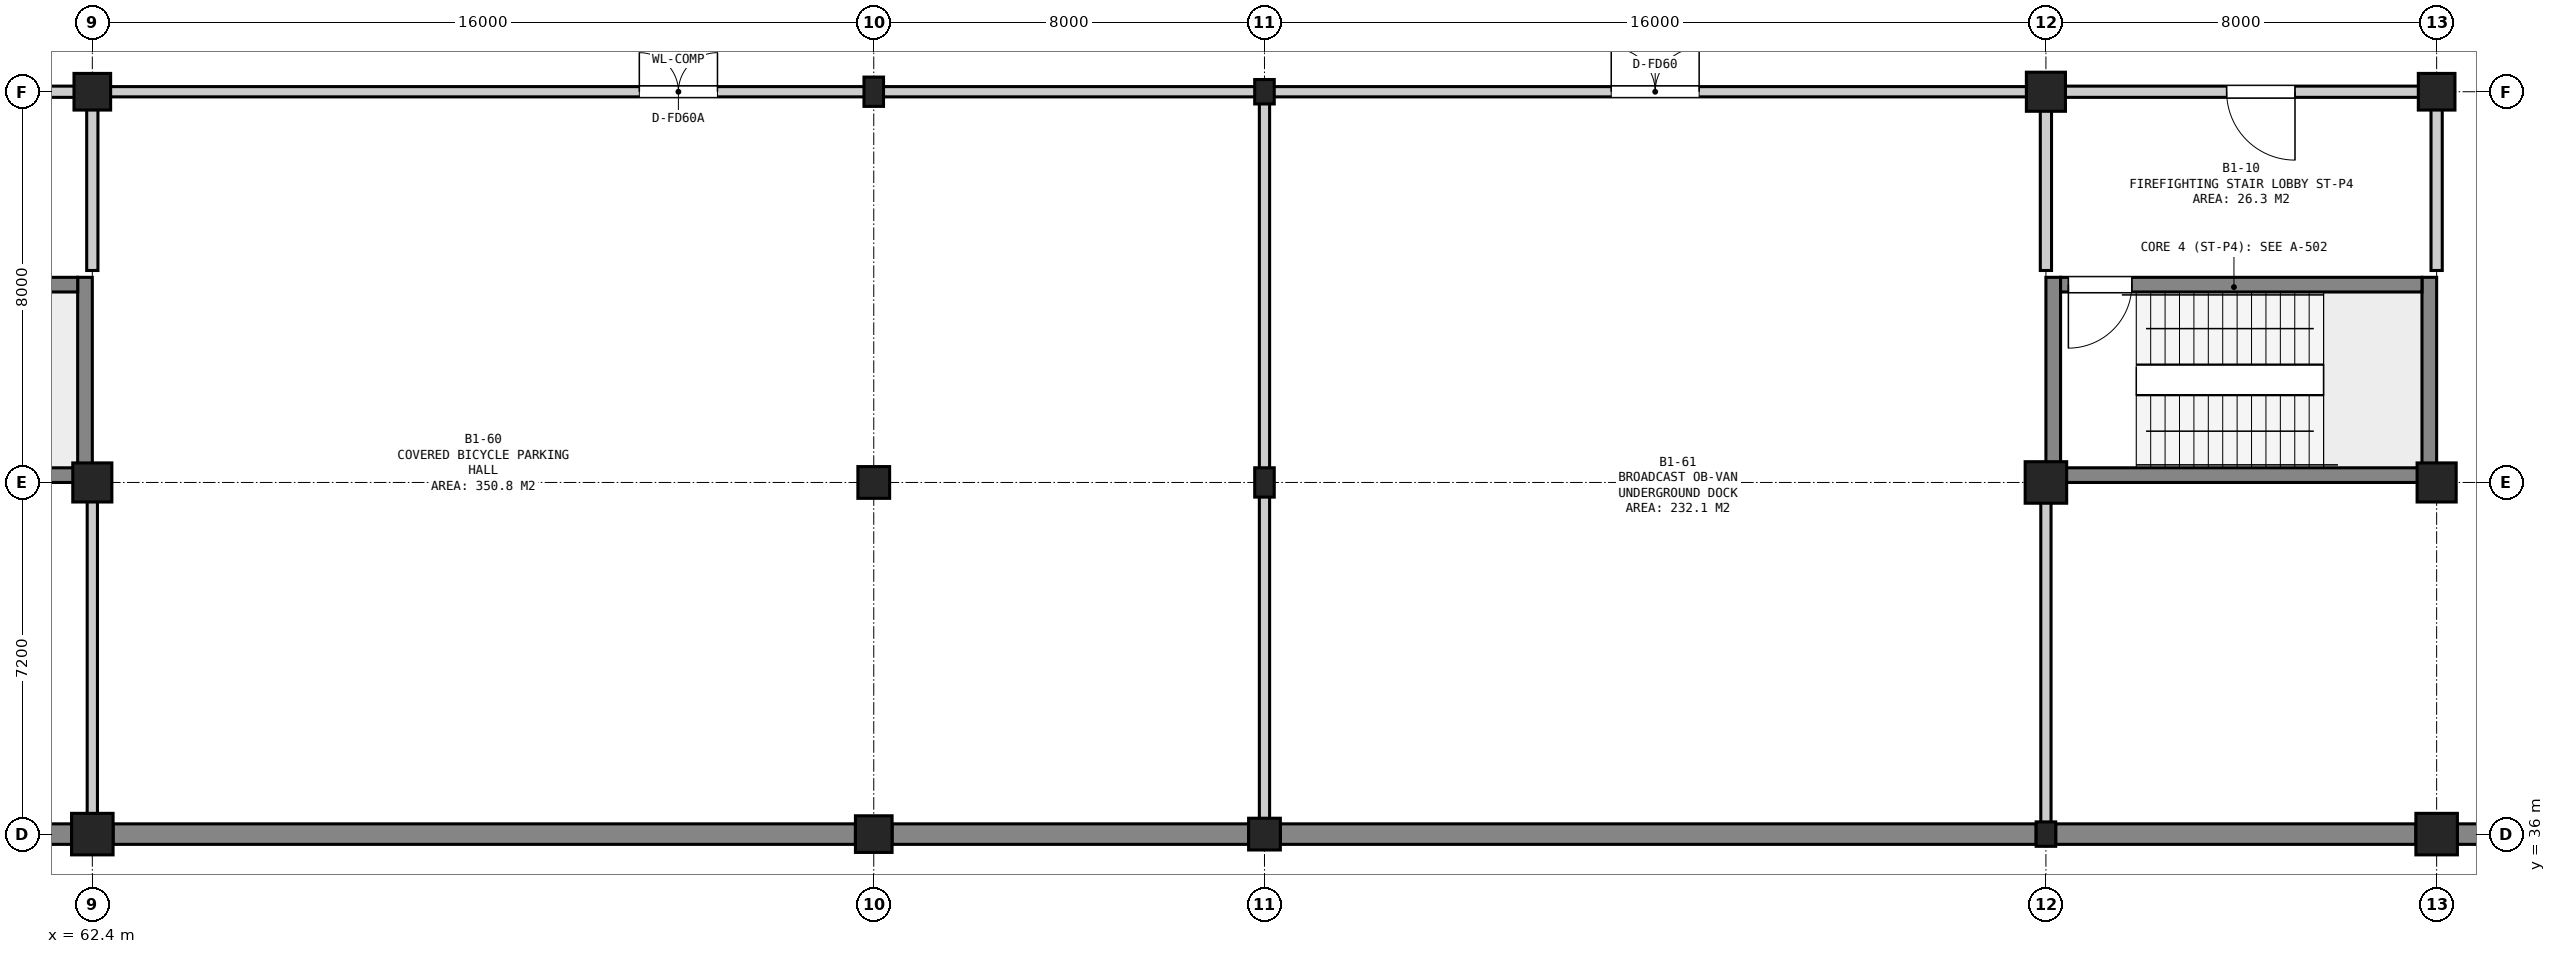
"""IFC4 building model, lengths in metres.
Left out: names, types, materials, properties, quantities, classifications, styles, units other than length and angle.
Written with IfcOpenShell. Run it as: python <this file> out.ifc"""

import sys

from ifc_helpers import new_model, si_unit, direction, frame, frame_2d, origin, origin_2d, place, context, subcontext, project, spatial, rectangle, extrude, element, fill, save


model = new_model("IFC4")
c1 = context("Model", 3, precision=1e-05, world=origin(), true_north=direction((0.0, 1.0)))
c2 = subcontext(c1, "Body", "Model", "MODEL_VIEW")
j1 = project(units=[si_unit("LENGTHUNIT", "METRE"), si_unit("PLANEANGLEUNIT", "RADIAN")], contexts=[c1])
p1 = place(None, origin())
s1 = spatial("IfcSite", under=j1, at=p1, CompositionType="ELEMENT")
p2 = place(p1, origin())
s2 = spatial("IfcBuilding", under=s1, at=p2, CompositionType="ELEMENT")
p3 = place(p2, frame((0.0, 0.0, -4.5)))
s3 = spatial("IfcBuildingStorey", under=s2, at=p3, CompositionType="ELEMENT", Elevation=-4.5)
p4 = place(p3, frame((62.4, 36.0, 0.0), z_axis=(0.0, 0.0, 1.0), x_axis=(1.0, 0.0, 0.0)))
e1 = element("IfcColumn", 1, at=p4, inside=s3, PredefinedType="COLUMN", context=c2, shape_type="SweptSolid", body=[
    extrude(rectangle(XDim=0.85, YDim=0.85, at=origin_2d()), origin(), (0.0, 0.0, 1.0), 4.5),
])
p5 = place(p3, frame((62.4, 43.2, 0.0), z_axis=(0.0, 0.0, 1.0), x_axis=(1.0, 0.0, 0.0)))
e2 = element("IfcColumn", 2, at=p5, inside=s3, PredefinedType="COLUMN", context=c2, shape_type="SweptSolid", body=[
    extrude(rectangle(XDim=0.8, YDim=0.8, at=origin_2d()), origin(), (0.0, 0.0, 1.0), 4.5),
])
for number, where, z_axis, x_axis in (
    (3, (62.4, 51.2, 0.0), (0.0, 0.0, 1.0), (1.0, 0.0, 0.0)),
    (4, (78.4, 36.0, 0.0), (0.0, 0.0, 1.0), (1.0, 0.0, 0.0)),
):
    element("IfcColumn", number, at=place(p3, frame(where, z_axis=z_axis, x_axis=x_axis)), inside=s3, PredefinedType="COLUMN", context=c2, shape_type="SweptSolid", body=[
        extrude(rectangle(XDim=0.75, YDim=0.75, at=origin_2d()), origin(), (0.0, 0.0, 1.0), 4.5),
    ])
p6 = place(p3, frame((78.4, 43.2, 0.0), z_axis=(0.0, 0.0, 1.0), x_axis=(1.0, 0.0, 0.0)))
e5 = element("IfcColumn", 5, at=p6, inside=s3, PredefinedType="COLUMN", context=c2, shape_type="SweptSolid", body=[
    extrude(rectangle(XDim=0.65, YDim=0.65, at=origin_2d()), origin(), (0.0, 0.0, 1.0), 4.5),
])
p7 = place(p3, frame((78.4, 51.2, 0.0), z_axis=(0.0, 0.0, 1.0), x_axis=(1.0, 0.0, 0.0)))
e6 = element("IfcColumn", 6, at=p7, inside=s3, PredefinedType="COLUMN", context=c2, shape_type="SweptSolid", body=[
    extrude(rectangle(XDim=0.4, YDim=0.6, at=origin_2d()), origin(), (0.0, 0.0, 1.0), 4.5),
])
p8 = place(p3, frame((86.4, 36.0, 0.0), z_axis=(0.0, 0.0, 1.0), x_axis=(1.0, 0.0, 0.0)))
e7 = element("IfcColumn", 7, at=p8, inside=s3, PredefinedType="COLUMN", context=c2, shape_type="SweptSolid", body=[
    extrude(rectangle(XDim=0.65, YDim=0.65, at=origin_2d()), origin(), (0.0, 0.0, 1.0), 4.5),
])
p9 = place(p3, frame((86.4, 43.2, 0.0), z_axis=(0.0, 0.0, 1.0), x_axis=(1.0, 0.0, 0.0)))
e8 = element("IfcColumn", 8, at=p9, inside=s3, PredefinedType="COLUMN", context=c2, shape_type="SweptSolid", body=[
    extrude(rectangle(XDim=0.4, YDim=0.6, at=origin_2d()), origin(), (0.0, 0.0, 1.0), 4.5),
])
for number, where, z_axis, x_axis in (
    (9, (86.4, 51.2, 0.0), (0.0, 0.0, 1.0), (1.0, 0.0, 0.0)),
    (10, (102.4, 36.0, 0.0), (0.0, 0.0, 1.0), (1.0, 0.0, 0.0)),
):
    element("IfcColumn", number, at=place(p3, frame(where, z_axis=z_axis, x_axis=x_axis)), inside=s3, PredefinedType="COLUMN", context=c2, shape_type="SweptSolid", body=[
        extrude(rectangle(XDim=0.4, YDim=0.5, at=origin_2d()), origin(), (0.0, 0.0, 1.0), 4.5),
    ])
p10 = place(p3, frame((102.4, 43.2, 0.0), z_axis=(0.0, 0.0, 1.0), x_axis=(1.0, 0.0, 0.0)))
e11 = element("IfcColumn", 11, at=p10, inside=s3, PredefinedType="COLUMN", context=c2, shape_type="SweptSolid", body=[
    extrude(rectangle(XDim=0.85, YDim=0.85, at=origin_2d()), origin(), (0.0, 0.0, 1.0), 4.5),
])
p11 = place(p3, frame((102.4, 51.2, 0.0), z_axis=(0.0, 0.0, 1.0), x_axis=(1.0, 0.0, 0.0)))
e12 = element("IfcColumn", 12, at=p11, inside=s3, PredefinedType="COLUMN", context=c2, shape_type="SweptSolid", body=[
    extrude(rectangle(XDim=0.8, YDim=0.8, at=origin_2d()), origin(), (0.0, 0.0, 1.0), 4.5),
])
p12 = place(p3, frame((110.4, 36.0, 0.0), z_axis=(0.0, 0.0, 1.0), x_axis=(1.0, 0.0, 0.0)))
e13 = element("IfcColumn", 13, at=p12, inside=s3, PredefinedType="COLUMN", context=c2, shape_type="SweptSolid", body=[
    extrude(rectangle(XDim=0.85, YDim=0.85, at=origin_2d()), origin(), (0.0, 0.0, 1.0), 4.5),
])
p13 = place(p3, frame((110.4, 43.2, 0.0), z_axis=(0.0, 0.0, 1.0), x_axis=(1.0, 0.0, 0.0)))
e14 = element("IfcColumn", 14, at=p13, inside=s3, PredefinedType="COLUMN", context=c2, shape_type="SweptSolid", body=[
    extrude(rectangle(XDim=0.8, YDim=0.8, at=origin_2d()), origin(), (0.0, 0.0, 1.0), 4.5),
])
p14 = place(p3, frame((110.4, 51.2, 0.0), z_axis=(0.0, 0.0, 1.0), x_axis=(1.0, 0.0, 0.0)))
e15 = element("IfcColumn", 15, at=p14, inside=s3, PredefinedType="COLUMN", context=c2, shape_type="SweptSolid", body=[
    extrude(rectangle(XDim=0.75, YDim=0.75, at=origin_2d()), origin(), (0.0, 0.0, 1.0), 4.5),
])
p15 = place(p3, frame((54.6, 36.0, 0.0), z_axis=(0.0, 0.0, 1.0), x_axis=(1.0, 0.0, 0.0)))
e16 = element("IfcWall", 16, at=p15, inside=s3, PredefinedType="SOLIDWALL", context=c2, shape_type="SweptSolid", body=[
    extrude(rectangle(XDim=7.375, YDim=0.42, at=frame_2d((3.688, 0.0))), origin(), (0.0, 0.0, 1.0), 4.08),
])
p16 = place(p3, frame((62.825, 36.0, 0.0), z_axis=(0.0, 0.0, 1.0), x_axis=(1.0, 0.0, 0.0)))
e17 = element("IfcWall", 17, at=p16, inside=s3, PredefinedType="SOLIDWALL", context=c2, shape_type="SweptSolid", body=[
    extrude(rectangle(XDim=15.2, YDim=0.42, at=frame_2d((7.6, 0.0))), origin(), (0.0, 0.0, 1.0), 4.08),
])
p17 = place(p3, frame((78.775, 36.0, 0.0), z_axis=(0.0, 0.0, 1.0), x_axis=(1.0, 0.0, 0.0)))
e18 = element("IfcWall", 18, at=p17, inside=s3, PredefinedType="SOLIDWALL", context=c2, shape_type="SweptSolid", body=[
    extrude(rectangle(XDim=7.3, YDim=0.42, at=frame_2d((3.65, 0.0))), origin(), (0.0, 0.0, 1.0), 4.08),
])
p18 = place(p3, frame((86.725, 36.0, 0.0), z_axis=(0.0, 0.0, 1.0), x_axis=(1.0, 0.0, 0.0)))
e19 = element("IfcWall", 19, at=p18, inside=s3, PredefinedType="SOLIDWALL", context=c2, shape_type="SweptSolid", body=[
    extrude(rectangle(XDim=15.475, YDim=0.42, at=frame_2d((7.737, 0.0))), origin(), (0.0, 0.0, 1.0), 4.08),
])
p19 = place(p3, frame((102.6, 36.0, 0.0), z_axis=(0.0, 0.0, 1.0), x_axis=(1.0, 0.0, 0.0)))
e20 = element("IfcWall", 20, at=p19, inside=s3, PredefinedType="SOLIDWALL", context=c2, shape_type="SweptSolid", body=[
    extrude(rectangle(XDim=7.375, YDim=0.42, at=frame_2d((3.688, 0.0))), origin(), (0.0, 0.0, 1.0), 4.08),
])
p20 = place(p3, frame((110.825, 36.0, 0.0), z_axis=(0.0, 0.0, 1.0), x_axis=(1.0, 0.0, 0.0)))
e21 = element("IfcWall", 21, at=p20, inside=s3, PredefinedType="SOLIDWALL", context=c2, shape_type="SweptSolid", body=[
    extrude(rectangle(XDim=5.575, YDim=0.42, at=frame_2d((2.788, 0.0))), origin(), (0.0, 0.0, 1.0), 4.08),
])
p21 = place(p3, frame((62.25, 43.2, 0.0), z_axis=(0.0, 0.0, 1.0), x_axis=(0.0, 1.0, 0.0)))
e22 = element("IfcWall", 22, at=p21, inside=s3, PredefinedType="SHEAR", context=c2, shape_type="SweptSolid", body=[
    extrude(rectangle(XDim=4.2, YDim=0.3, at=frame_2d((2.1, 0.0))), origin(), (0.0, 0.0, 1.0), 4.08),
])
p22 = place(p3, frame((54.7, 43.35, 0.0), z_axis=(0.0, 0.0, 1.0), x_axis=(1.0, 0.0, 0.0)))
e23 = element("IfcWall", 23, at=p22, inside=s3, PredefinedType="SHEAR", context=c2, shape_type="SweptSolid", body=[
    extrude(rectangle(XDim=7.4, YDim=0.3, at=frame_2d((3.7, 0.0))), origin(), (0.0, 0.0, 1.0), 4.08),
])
p23 = place(p3, frame((54.7, 47.25, 0.0), z_axis=(0.0, 0.0, 1.0), x_axis=(1.0, 0.0, 0.0)))
e24 = element("IfcWall", 24, at=p23, inside=s3, PredefinedType="SHEAR", context=c2, shape_type="SweptSolid", body=[
    extrude(rectangle(XDim=7.4, YDim=0.3, at=frame_2d((3.7, 0.0))), origin(), (0.0, 0.0, 1.0), 4.08),
])
p24 = place(p23, frame((0.16, 0.0, 0.0)))
e25 = element("IfcOpeningElement", 25, at=p24, cuts=e24, PredefinedType="OPENING", context=c2, shape_type="SweptSolid", body=[
    extrude(rectangle(XDim=1.3, YDim=2.18, at=frame_2d((0.65, 1.09))), frame((0.0, 0.162, 0.0), z_axis=(0.0, -1.0, 0.0), x_axis=(1.0, 0.0, 0.0)), (0.0, 0.0, 1.0), 0.324),
])
for number, where, z_axis, x_axis in (
    (26, (102.55, 43.2, 0.0), (0.0, 0.0, 1.0), (0.0, 1.0, 0.0)),
    (27, (110.25, 43.2, 0.0), (0.0, 0.0, 1.0), (0.0, 1.0, 0.0)),
):
    element("IfcWall", number, at=place(p3, frame(where, z_axis=z_axis, x_axis=x_axis)), inside=s3, PredefinedType="SHEAR", context=c2, shape_type="SweptSolid", body=[
        extrude(rectangle(XDim=4.2, YDim=0.3, at=frame_2d((2.1, 0.0))), origin(), (0.0, 0.0, 1.0), 4.08),
    ])
p25 = place(p3, frame((102.7, 43.35, 0.0), z_axis=(0.0, 0.0, 1.0), x_axis=(1.0, 0.0, 0.0)))
e28 = element("IfcWall", 28, at=p25, inside=s3, PredefinedType="SHEAR", context=c2, shape_type="SweptSolid", body=[
    extrude(rectangle(XDim=7.4, YDim=0.3, at=frame_2d((3.7, 0.0))), origin(), (0.0, 0.0, 1.0), 4.08),
])
p26 = place(p3, frame((102.7, 47.25, 0.0), z_axis=(0.0, 0.0, 1.0), x_axis=(1.0, 0.0, 0.0)))
e29 = element("IfcWall", 29, at=p26, inside=s3, PredefinedType="SHEAR", context=c2, shape_type="SweptSolid", body=[
    extrude(rectangle(XDim=7.4, YDim=0.3, at=frame_2d((3.7, 0.0))), origin(), (0.0, 0.0, 1.0), 4.08),
])
p27 = place(p26, frame((0.16, 0.0, 0.0)))
e30 = element("IfcOpeningElement", 30, at=p27, cuts=e29, PredefinedType="OPENING", context=c2, shape_type="SweptSolid", body=[
    extrude(rectangle(XDim=1.3, YDim=2.18, at=frame_2d((0.65, 1.09))), frame((0.0, 0.162, 0.0), z_axis=(0.0, -1.0, 0.0), x_axis=(1.0, 0.0, 0.0)), (0.0, 0.0, 1.0), 0.324),
])
p28 = place(p3, frame((54.54, 51.2, 0.0), z_axis=(0.0, 0.0, 1.0), x_axis=(1.0, 0.0, 0.0)))
e31 = element("IfcWall", 31, at=p28, inside=s3, PredefinedType="SOLIDWALL", context=c2, shape_type="SweptSolid", body=[
    extrude(rectangle(XDim=7.72, YDim=0.23, at=frame_2d((3.86, 0.0))), origin(), (0.0, 0.0, 1.0), 3.525),
])
p29 = place(p28, frame((3.56, 0.0, 0.0)))
e32 = element("IfcOpeningElement", 32, at=p29, cuts=e31, PredefinedType="OPENING", context=c2, shape_type="SweptSolid", body=[
    extrude(rectangle(XDim=1.4, YDim=2.2, at=frame_2d((0.7, 1.1))), frame((0.0, 0.127, 0.0), z_axis=(0.0, -1.0, 0.0), x_axis=(1.0, 0.0, 0.0)), (0.0, 0.0, 1.0), 0.254),
])
p30 = place(p3, frame((62.4, 47.54, 0.0), z_axis=(0.0, 0.0, 1.0), x_axis=(0.0, 1.0, 0.0)))
e33 = element("IfcWall", 33, at=p30, inside=s3, PredefinedType="SOLIDWALL", context=c2, shape_type="SweptSolid", body=[
    extrude(rectangle(XDim=3.52, YDim=0.23, at=frame_2d((1.76, 0.0))), origin(), (0.0, 0.0, 1.0), 3.525),
])
p31 = place(p3, frame((102.54, 51.2, 0.0), z_axis=(0.0, 0.0, 1.0), x_axis=(1.0, 0.0, 0.0)))
e34 = element("IfcWall", 34, at=p31, inside=s3, PredefinedType="SOLIDWALL", context=c2, shape_type="SweptSolid", body=[
    extrude(rectangle(XDim=7.72, YDim=0.23, at=frame_2d((3.86, 0.0))), origin(), (0.0, 0.0, 1.0), 3.225),
])
p32 = place(p31, frame((3.56, 0.0, 0.0)))
e35 = element("IfcOpeningElement", 35, at=p32, cuts=e34, PredefinedType="OPENING", context=c2, shape_type="SweptSolid", body=[
    extrude(rectangle(XDim=1.4, YDim=2.2, at=frame_2d((0.7, 1.1))), frame((0.0, 0.127, 0.0), z_axis=(0.0, -1.0, 0.0), x_axis=(1.0, 0.0, 0.0)), (0.0, 0.0, 1.0), 0.254),
])
p33 = place(p3, frame((102.4, 47.54, 0.0), z_axis=(0.0, 0.0, 1.0), x_axis=(0.0, 1.0, 0.0)))
e36 = element("IfcWall", 36, at=p33, inside=s3, PredefinedType="SOLIDWALL", context=c2, shape_type="SweptSolid", body=[
    extrude(rectangle(XDim=3.52, YDim=0.23, at=frame_2d((1.76, 0.0))), origin(), (0.0, 0.0, 1.0), 3.575),
])
p34 = place(p3, frame((110.4, 47.54, 0.0), z_axis=(0.0, 0.0, 1.0), x_axis=(0.0, 1.0, 0.0)))
e37 = element("IfcWall", 37, at=p34, inside=s3, PredefinedType="SOLIDWALL", context=c2, shape_type="SweptSolid", body=[
    extrude(rectangle(XDim=3.52, YDim=0.23, at=frame_2d((1.76, 0.0))), origin(), (0.0, 0.0, 1.0), 3.475),
])
p35 = place(p3, frame((62.54, 51.2, 0.0), z_axis=(0.0, 0.0, 1.0), x_axis=(1.0, 0.0, 0.0)))
e38 = element("IfcWall", 38, at=p35, inside=s3, PredefinedType="SOLIDWALL", context=c2, shape_type="SweptSolid", body=[
    extrude(rectangle(XDim=23.72, YDim=0.21, at=frame_2d((11.86, 0.0))), origin(), (0.0, 0.0, 1.0), 2.925),
])
p36 = place(p35, frame((11.06, 0.0, 0.0)))
e39 = element("IfcOpeningElement", 39, at=p36, cuts=e38, PredefinedType="OPENING", context=c2, shape_type="SweptSolid", body=[
    extrude(rectangle(XDim=1.6, YDim=2.2, at=frame_2d((0.8, 1.1))), frame((0.0, 0.117, 0.0), z_axis=(0.0, -1.0, 0.0), x_axis=(1.0, 0.0, 0.0)), (0.0, 0.0, 1.0), 0.234),
])
p37 = place(p3, frame((62.4, 36.105, 0.0), z_axis=(0.0, 0.0, 1.0), x_axis=(0.0, 1.0, 0.0)))
e40 = element("IfcWall", 40, at=p37, inside=s3, PredefinedType="SOLIDWALL", context=c2, shape_type="SweptSolid", body=[
    extrude(rectangle(XDim=6.955, YDim=0.21, at=frame_2d((3.478, 0.0))), origin(), (0.0, 0.0, 1.0), 3.425),
])
p38 = place(p3, frame((86.4, 36.225, 0.0), z_axis=(0.0, 0.0, 1.0), x_axis=(0.0, 1.0, 0.0)))
e41 = element("IfcWall", 41, at=p38, inside=s3, PredefinedType="SOLIDWALL", context=c2, shape_type="SweptSolid", body=[
    extrude(rectangle(XDim=14.835, YDim=0.21, at=frame_2d((7.417, 0.0))), origin(), (0.0, 0.0, 1.0), 3.275),
])
p39 = place(p3, frame((86.54, 51.2, 0.0), z_axis=(0.0, 0.0, 1.0), x_axis=(1.0, 0.0, 0.0)))
e42 = element("IfcWall", 42, at=p39, inside=s3, PredefinedType="SOLIDWALL", context=c2, shape_type="SweptSolid", body=[
    extrude(rectangle(XDim=15.72, YDim=0.21, at=frame_2d((7.86, 0.0))), origin(), (0.0, 0.0, 1.0), 2.925),
])
p40 = place(p39, frame((6.96, 0.0, 0.0)))
e43 = element("IfcOpeningElement", 43, at=p40, cuts=e42, PredefinedType="OPENING", context=c2, shape_type="SweptSolid", body=[
    extrude(rectangle(XDim=1.8, YDim=2.3, at=frame_2d((0.9, 1.15))), frame((0.0, 0.117, 0.0), z_axis=(0.0, -1.0, 0.0), x_axis=(1.0, 0.0, 0.0)), (0.0, 0.0, 1.0), 0.234),
])
p41 = place(p3, frame((102.4, 36.225, 0.0), z_axis=(0.0, 0.0, 1.0), x_axis=(0.0, 1.0, 0.0)))
e44 = element("IfcWall", 44, at=p41, inside=s3, PredefinedType="SOLIDWALL", context=c2, shape_type="SweptSolid", body=[
    extrude(rectangle(XDim=6.835, YDim=0.21, at=frame_2d((3.417, 0.0))), origin(), (0.0, 0.0, 1.0), 3.475),
])
p42 = place(p27, frame((1.3, 0.0, 0.0), z_axis=(0.0, 0.0, 1.0), x_axis=(-1.0, 0.0, 0.0)))
e45 = element("IfcDoor", 45, at=p42, inside=s3, OperationType="SINGLE_SWING_RIGHT", PredefinedType="DOOR", context=c2, shape_type="SweptSolid", body=[
    extrude(rectangle(XDim=1.3, YDim=2.18, at=frame_2d((0.65, 1.09))), frame((0.0, 0.025, 0.0), z_axis=(0.0, -1.0, 0.0), x_axis=(1.0, 0.0, 0.0)), (0.0, 0.0, 1.0), 0.05),
])
fill(e30, e45)
p43 = place(p32, frame((1.4, 0.0, 0.0), z_axis=(0.0, 0.0, 1.0), x_axis=(-1.0, 0.0, 0.0)))
e46 = element("IfcDoor", 46, at=p43, inside=s3, OperationType="SINGLE_SWING_LEFT", PredefinedType="DOOR", context=c2, shape_type="SweptSolid", body=[
    extrude(rectangle(XDim=1.4, YDim=2.2, at=frame_2d((0.7, 1.1))), frame((0.0, 0.025, 0.0), z_axis=(0.0, -1.0, 0.0), x_axis=(1.0, 0.0, 0.0)), (0.0, 0.0, 1.0), 0.05),
])
fill(e35, e46)
p44 = place(p36, origin())
e47 = element("IfcDoor", 47, at=p44, inside=s3, OperationType="DOUBLE_DOOR_SINGLE_SWING", PredefinedType="DOOR", context=c2, shape_type="SweptSolid", body=[
    extrude(rectangle(XDim=1.6, YDim=2.2, at=frame_2d((0.8, 1.1))), frame((0.0, 0.025, 0.0), z_axis=(0.0, -1.0, 0.0), x_axis=(1.0, 0.0, 0.0)), (0.0, 0.0, 1.0), 0.05),
])
fill(e39, e47)
p45 = place(p40, origin())
e48 = element("IfcDoor", 48, at=p45, inside=s3, OperationType="DOUBLE_DOOR_SINGLE_SWING", PredefinedType="DOOR", context=c2, shape_type="SweptSolid", body=[
    extrude(rectangle(XDim=1.8, YDim=2.3, at=frame_2d((0.9, 1.15))), frame((0.0, 0.025, 0.0), z_axis=(0.0, -1.0, 0.0), x_axis=(1.0, 0.0, 0.0)), (0.0, 0.0, 1.0), 0.05),
])
fill(e43, e48)
save(model, sys.argv[1])
